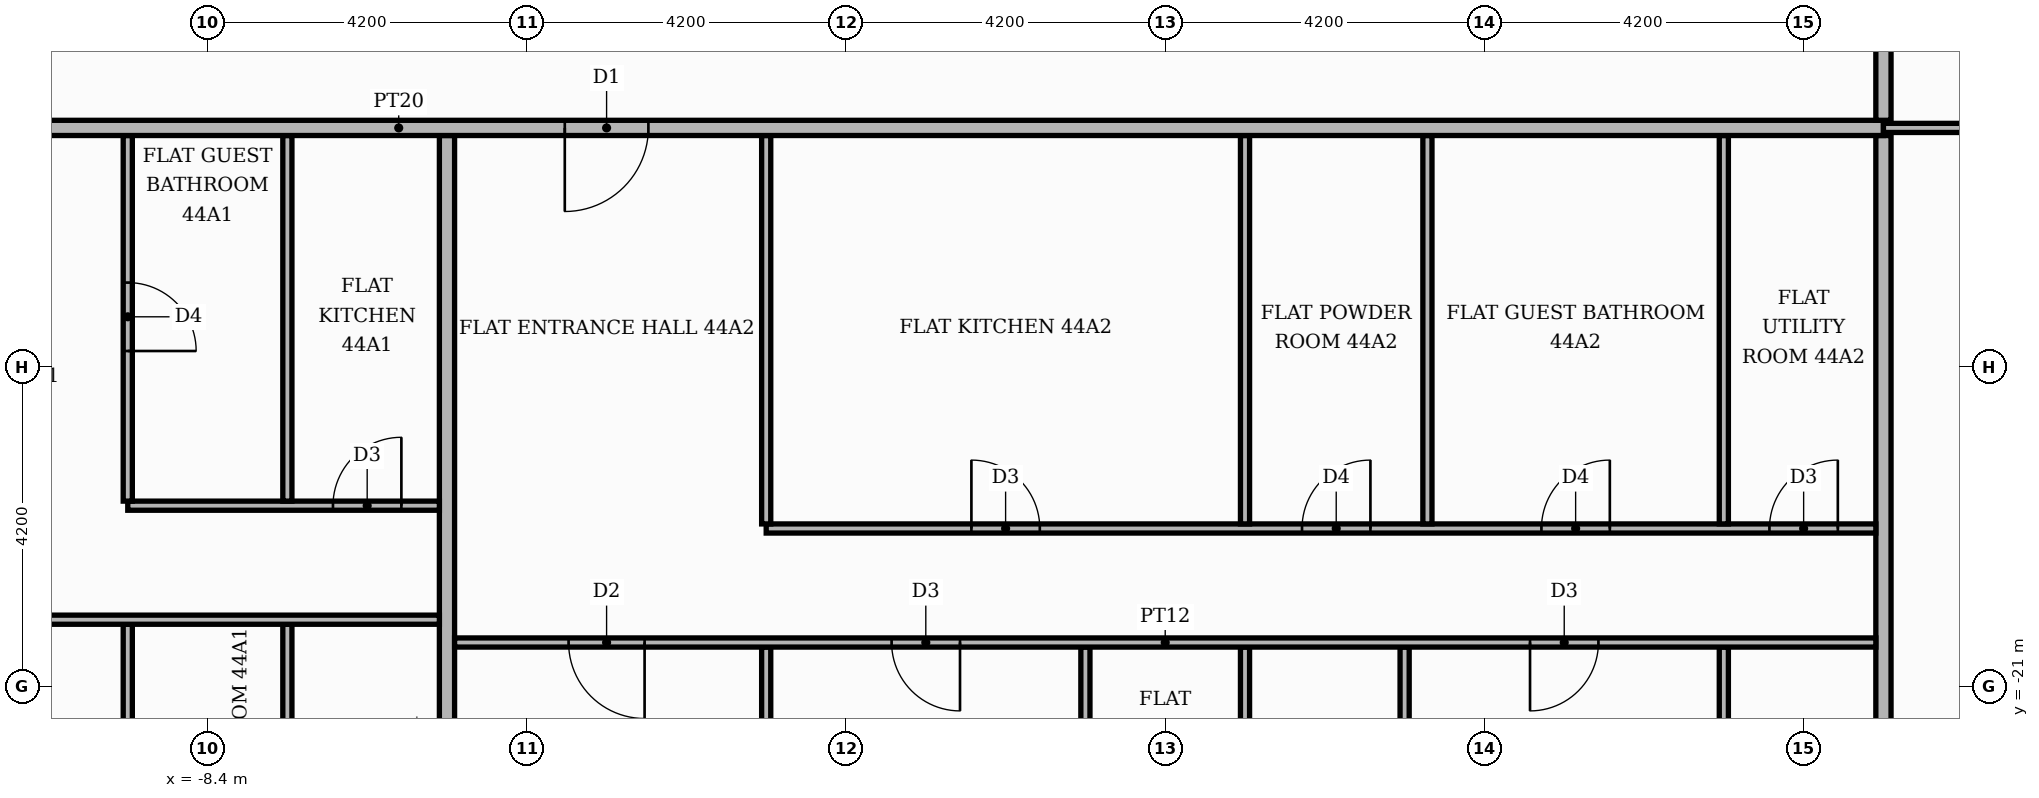
"""IFC4 building model, lengths in metres.
Left out: names, types, materials, properties, quantities, classifications, styles, units other than length and angle.
Written with IfcOpenShell. Run it as: python <this file> out.ifc"""

import sys

from ifc_helpers import new_model, si_unit, direction, frame, frame_2d, origin, place, context, subcontext, project, spatial, rectangle, extrude, element, fill, save


model = new_model("IFC4")
c1 = context("Model", 3, precision=1e-05, world=origin(), true_north=direction((0.0, 1.0)))
c2 = subcontext(c1, "Body", "Model", "MODEL_VIEW")
j1 = project(units=[si_unit("LENGTHUNIT", "METRE"), si_unit("PLANEANGLEUNIT", "RADIAN")], contexts=[c1])
p1 = place(None, origin())
s1 = spatial("IfcSite", under=j1, at=p1, CompositionType="ELEMENT")
p2 = place(p1, origin())
s2 = spatial("IfcBuilding", under=s1, at=p2, CompositionType="ELEMENT")
p3 = place(p2, frame((0.0, 0.0, 188.4)))
s3 = spatial("IfcBuildingStorey", under=s2, at=p3, CompositionType="ELEMENT", Elevation=188.4)
p4 = place(p3, frame((-9.45, -25.42, 0.0), z_axis=(0.0, 0.0, 1.0), x_axis=(0.0, 1.0, 0.0)))
e1 = element("IfcWall", 1, at=p4, inside=s3, PredefinedType="PARTITIONING", context=c2, shape_type="SweptSolid", body=[
    extrude(rectangle(XDim=5.24, YDim=0.12, at=frame_2d((2.62, 0.0))), origin(), (0.0, 0.0, 1.0), 3.48),
])
p5 = place(p4, frame((2.05, 0.0, 0.0)))
e2 = element("IfcOpeningElement", 2, at=p5, cuts=e1, PredefinedType="OPENING", context=c2, shape_type="SweptSolid", body=[
    extrude(rectangle(XDim=0.9, YDim=2.1, at=frame_2d((0.45, 1.05))), frame((0.0, 0.07, 0.0), z_axis=(0.0, -1.0, 0.0), x_axis=(1.0, 0.0, 0.0)), (0.0, 0.0, 1.0), 0.14),
])
p6 = place(p3, frame((-7.35, -25.42, 0.0), z_axis=(0.0, 0.0, 1.0), x_axis=(0.0, 1.0, 0.0)))
e3 = element("IfcWall", 3, at=p6, inside=s3, PredefinedType="PARTITIONING", context=c2, shape_type="SweptSolid", body=[
    extrude(rectangle(XDim=5.24, YDim=0.12, at=frame_2d((2.62, 0.0))), origin(), (0.0, 0.0, 1.0), 3.48),
])
p7 = place(p6, frame((2.05, 0.0, 0.0)))
e4 = element("IfcOpeningElement", 4, at=p7, cuts=e3, PredefinedType="OPENING", context=c2, shape_type="SweptSolid", body=[
    extrude(rectangle(XDim=0.9, YDim=2.1, at=frame_2d((0.45, 1.05))), frame((0.0, 0.07, 0.0), z_axis=(0.0, -1.0, 0.0), x_axis=(1.0, 0.0, 0.0)), (0.0, 0.0, 1.0), 0.14),
])
p8 = place(p3, frame((-5.25, -25.42, 0.0), z_axis=(0.0, 0.0, 1.0), x_axis=(0.0, 1.0, 0.0)))
e5 = element("IfcWall", 5, at=p8, inside=s3, PredefinedType="PARTITIONING", context=c2, shape_type="SweptSolid", body=[
    extrude(rectangle(XDim=11.67, YDim=0.2, at=frame_2d((5.835, 0.0))), origin(), (0.0, 0.0, 1.0), 3.48),
])
p9 = place(p3, frame((-1.05, -25.42, 0.0), z_axis=(0.0, 0.0, 1.0), x_axis=(0.0, 1.0, 0.0)))
e6 = element("IfcWall", 6, at=p9, inside=s3, PredefinedType="PARTITIONING", context=c2, shape_type="SweptSolid", body=[
    extrude(rectangle(XDim=4.94, YDim=0.12, at=frame_2d((2.47, 0.0))), origin(), (0.0, 0.0, 1.0), 3.48),
])
p10 = place(p3, frame((3.15, -25.42, 0.0), z_axis=(0.0, 0.0, 1.0), x_axis=(0.0, 1.0, 0.0)))
e7 = element("IfcWall", 7, at=p10, inside=s3, PredefinedType="PARTITIONING", context=c2, shape_type="SweptSolid", body=[
    extrude(rectangle(XDim=4.94, YDim=0.12, at=frame_2d((2.47, 0.0))), origin(), (0.0, 0.0, 1.0), 3.48),
])
p11 = place(p10, frame((1.9, 0.0, 0.0)))
e8 = element("IfcOpeningElement", 8, at=p11, cuts=e7, PredefinedType="OPENING", context=c2, shape_type="SweptSolid", body=[
    extrude(rectangle(XDim=0.9, YDim=2.1, at=frame_2d((0.45, 1.05))), frame((0.0, 0.07, 0.0), z_axis=(0.0, -1.0, 0.0), x_axis=(1.0, 0.0, 0.0)), (0.0, 0.0, 1.0), 0.14),
])
p12 = place(p3, frame((5.25, -25.42, 0.0), z_axis=(0.0, 0.0, 1.0), x_axis=(0.0, 1.0, 0.0)))
e9 = element("IfcWall", 9, at=p12, inside=s3, PredefinedType="PARTITIONING", context=c2, shape_type="SweptSolid", body=[
    extrude(rectangle(XDim=4.94, YDim=0.12, at=frame_2d((2.47, 0.0))), origin(), (0.0, 0.0, 1.0), 3.48),
])
p13 = place(p12, frame((1.9, 0.0, 0.0)))
e10 = element("IfcOpeningElement", 10, at=p13, cuts=e9, PredefinedType="OPENING", context=c2, shape_type="SweptSolid", body=[
    extrude(rectangle(XDim=0.9, YDim=2.1, at=frame_2d((0.45, 1.05))), frame((0.0, 0.07, 0.0), z_axis=(0.0, -1.0, 0.0), x_axis=(1.0, 0.0, 0.0)), (0.0, 0.0, 1.0), 0.14),
])
p14 = place(p3, frame((7.35, -25.42, 0.0), z_axis=(0.0, 0.0, 1.0), x_axis=(0.0, 1.0, 0.0)))
e11 = element("IfcWall", 11, at=p14, inside=s3, PredefinedType="PARTITIONING", context=c2, shape_type="SweptSolid", body=[
    extrude(rectangle(XDim=4.94, YDim=0.12, at=frame_2d((2.47, 0.0))), origin(), (0.0, 0.0, 1.0), 3.48),
])
p15 = place(p3, frame((11.55, -25.42, 0.0), z_axis=(0.0, 0.0, 1.0), x_axis=(0.0, 1.0, 0.0)))
e12 = element("IfcWall", 12, at=p15, inside=s3, PredefinedType="PARTITIONING", context=c2, shape_type="SweptSolid", body=[
    extrude(rectangle(XDim=4.94, YDim=0.12, at=frame_2d((2.47, 0.0))), origin(), (0.0, 0.0, 1.0), 3.48),
])
p16 = place(p15, frame((1.9, 0.0, 0.0)))
e13 = element("IfcOpeningElement", 13, at=p16, cuts=e12, PredefinedType="OPENING", context=c2, shape_type="SweptSolid", body=[
    extrude(rectangle(XDim=0.9, YDim=2.1, at=frame_2d((0.45, 1.05))), frame((0.0, 0.07, 0.0), z_axis=(0.0, -1.0, 0.0), x_axis=(1.0, 0.0, 0.0)), (0.0, 0.0, 1.0), 0.14),
])
p17 = place(p3, frame((13.65, -25.42, 0.0), z_axis=(0.0, 0.0, 1.0), x_axis=(0.0, 1.0, 0.0)))
e14 = element("IfcWall", 14, at=p17, inside=s3, PredefinedType="PARTITIONING", context=c2, shape_type="SweptSolid", body=[
    extrude(rectangle(XDim=11.67, YDim=0.2, at=frame_2d((5.835, 0.0))), origin(), (0.0, 0.0, 1.0), 3.48),
])
p18 = place(p3, frame((-5.15, -20.42, 0.0), z_axis=(0.0, 0.0, 1.0), x_axis=(1.0, 0.0, 0.0)))
e15 = element("IfcWall", 15, at=p18, inside=s3, PredefinedType="PARTITIONING", context=c2, shape_type="SweptSolid", body=[
    extrude(rectangle(XDim=18.7, YDim=0.12, at=frame_2d((9.35, 0.0))), origin(), (0.0, 0.0, 1.0), 3.48),
])
p19 = place(p18, frame((1.5, 0.0, 0.0)))
e16 = element("IfcOpeningElement", 16, at=p19, cuts=e15, PredefinedType="OPENING", context=c2, shape_type="SweptSolid", body=[
    extrude(rectangle(XDim=1.0, YDim=2.1, at=frame_2d((0.5, 1.05))), frame((0.0, 0.07, 0.0), z_axis=(0.0, -1.0, 0.0), x_axis=(1.0, 0.0, 0.0)), (0.0, 0.0, 1.0), 0.14),
])
p20 = place(p18, frame((5.75, 0.0, 0.0)))
e17 = element("IfcOpeningElement", 17, at=p20, cuts=e15, PredefinedType="OPENING", context=c2, shape_type="SweptSolid", body=[
    extrude(rectangle(XDim=0.9, YDim=2.1, at=frame_2d((0.45, 1.05))), frame((0.0, 0.07, 0.0), z_axis=(0.0, -1.0, 0.0), x_axis=(1.0, 0.0, 0.0)), (0.0, 0.0, 1.0), 0.14),
])
p21 = place(p18, frame((14.15, 0.0, 0.0)))
e18 = element("IfcOpeningElement", 18, at=p21, cuts=e15, PredefinedType="OPENING", context=c2, shape_type="SweptSolid", body=[
    extrude(rectangle(XDim=0.9, YDim=2.1, at=frame_2d((0.45, 1.05))), frame((0.0, 0.07, 0.0), z_axis=(0.0, -1.0, 0.0), x_axis=(1.0, 0.0, 0.0)), (0.0, 0.0, 1.0), 0.14),
])
p22 = place(p3, frame((-25.42, -20.12, 0.0), z_axis=(0.0, 0.0, 1.0), x_axis=(1.0, 0.0, 0.0)))
e19 = element("IfcWall", 19, at=p22, inside=s3, PredefinedType="PARTITIONING", context=c2, shape_type="SweptSolid", body=[
    extrude(rectangle(XDim=20.07, YDim=0.12, at=frame_2d((10.035, 0.0))), origin(), (0.0, 0.0, 1.0), 3.48),
])
p23 = place(p22, frame((10.22, 0.0, 0.0)))
e20 = element("IfcOpeningElement", 20, at=p23, cuts=e19, PredefinedType="OPENING", context=c2, shape_type="SweptSolid", body=[
    extrude(rectangle(XDim=1.0, YDim=2.1, at=frame_2d((0.5, 1.05))), frame((0.0, 0.07, 0.0), z_axis=(0.0, -1.0, 0.0), x_axis=(1.0, 0.0, 0.0)), (0.0, 0.0, 1.0), 0.14),
])
p24 = place(p22, frame((13.42, 0.0, 0.0)))
e21 = element("IfcOpeningElement", 21, at=p24, cuts=e19, PredefinedType="OPENING", context=c2, shape_type="SweptSolid", body=[
    extrude(rectangle(XDim=0.9, YDim=2.1, at=frame_2d((0.45, 1.05))), frame((0.0, 0.07, 0.0), z_axis=(0.0, -1.0, 0.0), x_axis=(1.0, 0.0, 0.0)), (0.0, 0.0, 1.0), 0.14),
])
p25 = place(p3, frame((-1.05, -18.92, 0.0), z_axis=(0.0, 0.0, 1.0), x_axis=(1.0, 0.0, 0.0)))
e22 = element("IfcWall", 22, at=p25, inside=s3, PredefinedType="PARTITIONING", context=c2, shape_type="SweptSolid", body=[
    extrude(rectangle(XDim=14.6, YDim=0.12, at=frame_2d((7.3, 0.0))), origin(), (0.0, 0.0, 1.0), 3.48),
])
p26 = place(p25, frame((2.7, 0.0, 0.0)))
e23 = element("IfcOpeningElement", 23, at=p26, cuts=e22, PredefinedType="OPENING", context=c2, shape_type="SweptSolid", body=[
    extrude(rectangle(XDim=0.9, YDim=2.1, at=frame_2d((0.45, 1.05))), frame((0.0, 0.07, 0.0), z_axis=(0.0, -1.0, 0.0), x_axis=(1.0, 0.0, 0.0)), (0.0, 0.0, 1.0), 0.14),
])
p27 = place(p25, frame((7.05, 0.0, 0.0)))
e24 = element("IfcOpeningElement", 24, at=p27, cuts=e22, PredefinedType="OPENING", context=c2, shape_type="SweptSolid", body=[
    extrude(rectangle(XDim=0.9, YDim=2.1, at=frame_2d((0.45, 1.05))), frame((0.0, 0.07, 0.0), z_axis=(0.0, -1.0, 0.0), x_axis=(1.0, 0.0, 0.0)), (0.0, 0.0, 1.0), 0.14),
])
p28 = place(p25, frame((10.2, 0.0, 0.0)))
e25 = element("IfcOpeningElement", 25, at=p28, cuts=e22, PredefinedType="OPENING", context=c2, shape_type="SweptSolid", body=[
    extrude(rectangle(XDim=0.9, YDim=2.1, at=frame_2d((0.45, 1.05))), frame((0.0, 0.07, 0.0), z_axis=(0.0, -1.0, 0.0), x_axis=(1.0, 0.0, 0.0)), (0.0, 0.0, 1.0), 0.14),
])
p29 = place(p25, frame((13.2, 0.0, 0.0)))
e26 = element("IfcOpeningElement", 26, at=p29, cuts=e22, PredefinedType="OPENING", context=c2, shape_type="SweptSolid", body=[
    extrude(rectangle(XDim=0.9, YDim=2.1, at=frame_2d((0.45, 1.05))), frame((0.0, 0.07, 0.0), z_axis=(0.0, -1.0, 0.0), x_axis=(1.0, 0.0, 0.0)), (0.0, 0.0, 1.0), 0.14),
])
for number, where, z_axis, x_axis in (
    (27, (-1.05, -18.86, 0.0), (0.0, 0.0, 1.0), (0.0, 1.0, 0.0)),
    (28, (5.25, -18.86, 0.0), (0.0, 0.0, 1.0), (0.0, 1.0, 0.0)),
    (29, (7.65, -18.86, 0.0), (0.0, 0.0, 1.0), (0.0, 1.0, 0.0)),
    (30, (11.55, -18.86, 0.0), (0.0, 0.0, 1.0), (0.0, 1.0, 0.0)),
):
    element("IfcWall", number, at=place(p3, frame(where, z_axis=z_axis, x_axis=x_axis)), inside=s3, PredefinedType="PARTITIONING", context=c2, shape_type="SweptSolid", body=[
        extrude(rectangle(XDim=5.11, YDim=0.12, at=frame_2d((2.555, 0.0))), origin(), (0.0, 0.0, 1.0), 3.48),
    ])
p30 = place(p3, frame((-9.45, -18.62, 0.0), z_axis=(0.0, 0.0, 1.0), x_axis=(1.0, 0.0, 0.0)))
e31 = element("IfcWall", 31, at=p30, inside=s3, PredefinedType="PARTITIONING", context=c2, shape_type="SweptSolid", body=[
    extrude(rectangle(XDim=4.1, YDim=0.12, at=frame_2d((2.05, 0.0))), origin(), (0.0, 0.0, 1.0), 3.48),
])
p31 = place(p30, frame((2.7, 0.0, 0.0)))
e32 = element("IfcOpeningElement", 32, at=p31, cuts=e31, PredefinedType="OPENING", context=c2, shape_type="SweptSolid", body=[
    extrude(rectangle(XDim=0.9, YDim=2.1, at=frame_2d((0.45, 1.05))), frame((0.0, 0.07, 0.0), z_axis=(0.0, -1.0, 0.0), x_axis=(1.0, 0.0, 0.0)), (0.0, 0.0, 1.0), 0.14),
])
p32 = place(p3, frame((-9.45, -18.56, 0.0), z_axis=(0.0, 0.0, 1.0), x_axis=(0.0, 1.0, 0.0)))
e33 = element("IfcWall", 33, at=p32, inside=s3, PredefinedType="PARTITIONING", context=c2, shape_type="SweptSolid", body=[
    extrude(rectangle(XDim=4.81, YDim=0.12, at=frame_2d((2.405, 0.0))), origin(), (0.0, 0.0, 1.0), 3.48),
])
p33 = place(p32, frame((1.975, 0.0, 0.0)))
e34 = element("IfcOpeningElement", 34, at=p33, cuts=e33, PredefinedType="OPENING", context=c2, shape_type="SweptSolid", body=[
    extrude(rectangle(XDim=0.9, YDim=2.1, at=frame_2d((0.45, 1.05))), frame((0.0, 0.07, 0.0), z_axis=(0.0, -1.0, 0.0), x_axis=(1.0, 0.0, 0.0)), (0.0, 0.0, 1.0), 0.14),
])
p34 = place(p3, frame((-7.35, -18.56, 0.0), z_axis=(0.0, 0.0, 1.0), x_axis=(0.0, 1.0, 0.0)))
e35 = element("IfcWall", 35, at=p34, inside=s3, PredefinedType="PARTITIONING", context=c2, shape_type="SweptSolid", body=[
    extrude(rectangle(XDim=4.81, YDim=0.12, at=frame_2d((2.405, 0.0))), origin(), (0.0, 0.0, 1.0), 3.48),
])
p35 = place(p3, frame((-25.42, -13.65, 0.0), z_axis=(0.0, 0.0, 1.0), x_axis=(1.0, 0.0, 0.0)))
e36 = element("IfcWall", 36, at=p35, inside=s3, PredefinedType="PARTITIONING", context=c2, shape_type="SweptSolid", body=[
    extrude(rectangle(XDim=39.07, YDim=0.2, at=frame_2d((19.535, 0.0))), origin(), (0.0, 0.0, 1.0), 3.48),
])
p36 = place(p35, frame((13.32, 0.0, 0.0)))
e37 = element("IfcOpeningElement", 37, at=p36, cuts=e36, PredefinedType="OPENING", context=c2, shape_type="SweptSolid", body=[
    extrude(rectangle(XDim=1.1, YDim=2.4, at=frame_2d((0.55, 1.2))), frame((0.0, 0.11, 0.0), z_axis=(0.0, -1.0, 0.0), x_axis=(1.0, 0.0, 0.0)), (0.0, 0.0, 1.0), 0.22),
])
p37 = place(p35, frame((21.72, 0.0, 0.0)))
e38 = element("IfcOpeningElement", 38, at=p37, cuts=e36, PredefinedType="OPENING", context=c2, shape_type="SweptSolid", body=[
    extrude(rectangle(XDim=1.1, YDim=2.4, at=frame_2d((0.55, 1.2))), frame((0.0, 0.11, 0.0), z_axis=(0.0, -1.0, 0.0), x_axis=(1.0, 0.0, 0.0)), (0.0, 0.0, 1.0), 0.22),
])
p38 = place(p3, frame((13.65, -13.65, 0.0), z_axis=(0.0, 0.0, 1.0), x_axis=(1.0, 0.0, 0.0)))
e39 = element("IfcWall", 39, at=p38, inside=s3, PredefinedType="PARTITIONING", context=c2, shape_type="SweptSolid", body=[
    extrude(rectangle(XDim=6.17, YDim=0.12, at=frame_2d((3.085, 0.0))), origin(), (0.0, 0.0, 1.0), 3.48),
])
p39 = place(p38, frame((2.635, 0.0, 0.0)))
e40 = element("IfcOpeningElement", 40, at=p39, cuts=e39, PredefinedType="OPENING", context=c2, shape_type="SweptSolid", body=[
    extrude(rectangle(XDim=0.9, YDim=2.1, at=frame_2d((0.45, 1.05))), frame((0.0, 0.07, 0.0), z_axis=(0.0, -1.0, 0.0), x_axis=(1.0, 0.0, 0.0)), (0.0, 0.0, 1.0), 0.14),
])
p40 = place(p3, frame((13.65, -13.55, 0.0), z_axis=(0.0, 0.0, 1.0), x_axis=(0.0, 1.0, 0.0)))
e41 = element("IfcWall", 41, at=p40, inside=s3, PredefinedType="PARTITIONING", context=c2, shape_type="SweptSolid", body=[
    extrude(rectangle(XDim=2.45, YDim=0.2, at=frame_2d((1.225, 0.0))), origin(), (0.0, 0.0, 1.0), 3.48),
])
p41 = place(p33, frame((0.9, 0.0, 0.0), z_axis=(0.0, 0.0, 1.0), x_axis=(-1.0, 0.0, 0.0)))
e42 = element("IfcDoor", 42, at=p41, inside=s3, OperationType="SINGLE_SWING_LEFT", PredefinedType="DOOR", context=c2, shape_type="SweptSolid", body=[
    extrude(rectangle(XDim=0.9, YDim=2.1, at=frame_2d((0.45, 1.05))), frame((0.0, 0.025, 0.0), z_axis=(0.0, -1.0, 0.0), x_axis=(1.0, 0.0, 0.0)), (0.0, 0.0, 1.0), 0.05),
])
fill(e34, e42)
p42 = place(p31, origin())
e43 = element("IfcDoor", 43, at=p42, inside=s3, OperationType="SINGLE_SWING_RIGHT", PredefinedType="DOOR", context=c2, shape_type="SweptSolid", body=[
    extrude(rectangle(XDim=0.9, YDim=2.1, at=frame_2d((0.45, 1.05))), frame((0.0, 0.025, 0.0), z_axis=(0.0, -1.0, 0.0), x_axis=(1.0, 0.0, 0.0)), (0.0, 0.0, 1.0), 0.05),
])
fill(e32, e43)
p43 = place(p37, frame((1.1, 0.0, 0.0), z_axis=(0.0, 0.0, 1.0), x_axis=(-1.0, 0.0, 0.0)))
e44 = element("IfcDoor", 44, at=p43, inside=s3, OperationType="SINGLE_SWING_LEFT", PredefinedType="DOOR", context=c2, shape_type="SweptSolid", body=[
    extrude(rectangle(XDim=1.1, YDim=2.4, at=frame_2d((0.55, 1.2))), frame((0.0, 0.025, 0.0), z_axis=(0.0, -1.0, 0.0), x_axis=(1.0, 0.0, 0.0)), (0.0, 0.0, 1.0), 0.05),
])
fill(e38, e44)
p44 = place(p26, origin())
e45 = element("IfcDoor", 45, at=p44, inside=s3, OperationType="SINGLE_SWING_LEFT", PredefinedType="DOOR", context=c2, shape_type="SweptSolid", body=[
    extrude(rectangle(XDim=0.9, YDim=2.1, at=frame_2d((0.45, 1.05))), frame((0.0, 0.025, 0.0), z_axis=(0.0, -1.0, 0.0), x_axis=(1.0, 0.0, 0.0)), (0.0, 0.0, 1.0), 0.05),
])
fill(e23, e45)
p45 = place(p27, origin())
e46 = element("IfcDoor", 46, at=p45, inside=s3, OperationType="SINGLE_SWING_RIGHT", PredefinedType="DOOR", context=c2, shape_type="SweptSolid", body=[
    extrude(rectangle(XDim=0.9, YDim=2.1, at=frame_2d((0.45, 1.05))), frame((0.0, 0.025, 0.0), z_axis=(0.0, -1.0, 0.0), x_axis=(1.0, 0.0, 0.0)), (0.0, 0.0, 1.0), 0.05),
])
fill(e24, e46)
p46 = place(p28, origin())
e47 = element("IfcDoor", 47, at=p46, inside=s3, OperationType="SINGLE_SWING_RIGHT", PredefinedType="DOOR", context=c2, shape_type="SweptSolid", body=[
    extrude(rectangle(XDim=0.9, YDim=2.1, at=frame_2d((0.45, 1.05))), frame((0.0, 0.025, 0.0), z_axis=(0.0, -1.0, 0.0), x_axis=(1.0, 0.0, 0.0)), (0.0, 0.0, 1.0), 0.05),
])
fill(e25, e47)
p47 = place(p29, origin())
e48 = element("IfcDoor", 48, at=p47, inside=s3, OperationType="SINGLE_SWING_RIGHT", PredefinedType="DOOR", context=c2, shape_type="SweptSolid", body=[
    extrude(rectangle(XDim=0.9, YDim=2.1, at=frame_2d((0.45, 1.05))), frame((0.0, 0.025, 0.0), z_axis=(0.0, -1.0, 0.0), x_axis=(1.0, 0.0, 0.0)), (0.0, 0.0, 1.0), 0.05),
])
fill(e26, e48)
p48 = place(p19, frame((1.0, 0.0, 0.0), z_axis=(0.0, 0.0, 1.0), x_axis=(-1.0, 0.0, 0.0)))
e49 = element("IfcDoor", 49, at=p48, inside=s3, OperationType="SINGLE_SWING_RIGHT", PredefinedType="DOOR", context=c2, shape_type="SweptSolid", body=[
    extrude(rectangle(XDim=1.0, YDim=2.1, at=frame_2d((0.5, 1.05))), frame((0.0, 0.025, 0.0), z_axis=(0.0, -1.0, 0.0), x_axis=(1.0, 0.0, 0.0)), (0.0, 0.0, 1.0), 0.05),
])
fill(e16, e49)
p49 = place(p20, frame((0.9, 0.0, 0.0), z_axis=(0.0, 0.0, 1.0), x_axis=(-1.0, 0.0, 0.0)))
e50 = element("IfcDoor", 50, at=p49, inside=s3, OperationType="SINGLE_SWING_RIGHT", PredefinedType="DOOR", context=c2, shape_type="SweptSolid", body=[
    extrude(rectangle(XDim=0.9, YDim=2.1, at=frame_2d((0.45, 1.05))), frame((0.0, 0.025, 0.0), z_axis=(0.0, -1.0, 0.0), x_axis=(1.0, 0.0, 0.0)), (0.0, 0.0, 1.0), 0.05),
])
fill(e17, e50)
p50 = place(p21, frame((0.9, 0.0, 0.0), z_axis=(0.0, 0.0, 1.0), x_axis=(-1.0, 0.0, 0.0)))
e51 = element("IfcDoor", 51, at=p50, inside=s3, OperationType="SINGLE_SWING_LEFT", PredefinedType="DOOR", context=c2, shape_type="SweptSolid", body=[
    extrude(rectangle(XDim=0.9, YDim=2.1, at=frame_2d((0.45, 1.05))), frame((0.0, 0.025, 0.0), z_axis=(0.0, -1.0, 0.0), x_axis=(1.0, 0.0, 0.0)), (0.0, 0.0, 1.0), 0.05),
])
fill(e18, e51)
save(model, sys.argv[1])
